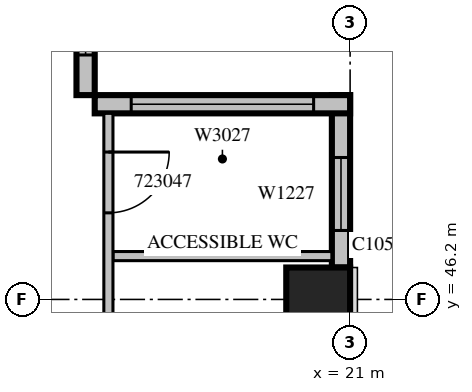
"""IFC4 building model, lengths in metres.
Left out: names, types, materials, properties, quantities, classifications, styles, units other than length and angle.
Written with IfcOpenShell. Run it as: python <this file> out.ifc"""

import sys

from ifc_helpers import new_model, si_unit, direction, frame, frame_2d, origin, origin_2d, place, context, subcontext, project, spatial, rectangle, extrude, source, transform, mapped, element, fill, save


model = new_model("IFC4")
c1 = context("Model", 3, precision=1e-05, world=origin(), true_north=direction((0.0, 1.0)))
c2 = subcontext(c1, "Body", "Model", "MODEL_VIEW")
j1 = project(units=[si_unit("LENGTHUNIT", "METRE"), si_unit("PLANEANGLEUNIT", "RADIAN")], contexts=[c1])
p1 = place(None, origin())
s1 = spatial("IfcSite", under=j1, at=p1, CompositionType="ELEMENT")
p2 = place(p1, origin())
s2 = spatial("IfcBuilding", under=s1, at=p2, CompositionType="ELEMENT")
p3 = place(p2, frame((0.0, 0.0, 107.7)))
s3 = spatial("IfcBuildingStorey", under=s2, at=p3, CompositionType="ELEMENT", Elevation=107.7)
m1 = source(origin(), c2, "Body", "SweptSolid", [
    extrude(rectangle(XDim=1.05, YDim=1.05, at=origin_2d()), origin(), (0.0, 0.0, 1.0), 4.2),
])
p4 = place(p3, frame((20.475, 46.2, 0.0), z_axis=(0.0, 0.0, 1.0), x_axis=(1.0, 0.0, 0.0)))
e1 = element("IfcColumn", 1, at=p4, inside=s3, PredefinedType="COLUMN", context=c2, shape_type="MappedRepresentation", body=[
    mapped(m1, transform((0.0, 0.0, 0.0), scale=1.0)),
])
m2 = source(origin(), c2, "Body", "SweptSolid", [
    extrude(rectangle(XDim=2.835, YDim=0.3, at=frame_2d((1.417, 0.0))), origin(), (0.0, 0.0, 1.0), 3.8),
])
p5 = place(p3, frame((20.85, 46.725, 0.0), z_axis=(0.0, 0.0, 1.0), x_axis=(0.0, 1.0, 0.0)))
e2 = element("IfcWall", 2, at=p5, inside=s3, PredefinedType="STANDARD", context=c2, shape_type="MappedRepresentation", body=[
    mapped(m2, transform((0.0, 0.0, 0.0), scale=1.0)),
])
m3 = source(origin(), c2, "Body", "SweptSolid", [
    extrude(rectangle(XDim=1.2, YDim=2.7, at=frame_2d((0.6, 1.35))), frame((0.0, 0.16, 0.0), z_axis=(0.0, -1.0, 0.0), x_axis=(1.0, 0.0, 0.0)), (0.0, 0.0, 1.0), 0.32),
])
p6 = place(p5, frame((0.609, 0.0, 0.6)))
e3 = element("IfcOpeningElement", 3, at=p6, cuts=e2, PredefinedType="OPENING", context=c2, shape_type="MappedRepresentation", body=[
    mapped(m3, transform((0.0, 0.0, 0.0), scale=1.0)),
])
m4 = source(origin(), c2, "Body", "SweptSolid", [
    extrude(rectangle(XDim=4.2, YDim=0.3, at=frame_2d((2.1, 0.0))), origin(), (0.0, 0.0, 1.0), 3.8),
])
p7 = place(p3, frame((21.0, 49.41, 0.0), z_axis=(0.0, 0.0, 1.0), x_axis=(-1.0, 0.0, 0.0)))
e4 = element("IfcWall", 4, at=p7, inside=s3, PredefinedType="STANDARD", context=c2, shape_type="MappedRepresentation", body=[
    mapped(m4, transform((0.0, 0.0, 0.0), scale=1.0)),
])
m5 = source(origin(), c2, "Body", "SweptSolid", [
    extrude(rectangle(XDim=3.0, YDim=2.7, at=frame_2d((1.5, 1.35))), frame((0.0, 0.16, 0.0), z_axis=(0.0, -1.0, 0.0), x_axis=(1.0, 0.0, 0.0)), (0.0, 0.0, 1.0), 0.32),
])
p8 = place(p7, frame((0.6, 0.0, 0.6)))
e5 = element("IfcOpeningElement", 5, at=p8, cuts=e4, PredefinedType="OPENING", context=c2, shape_type="MappedRepresentation", body=[
    mapped(m5, transform((0.0, 0.0, 0.0), scale=1.0)),
])
m6 = source(origin(), c2, "Body", "SweptSolid", [
    extrude(rectangle(XDim=2.52, YDim=0.3, at=frame_2d((1.26, 0.0))), origin(), (0.0, 0.0, 1.0), 3.8),
])
p9 = place(p3, frame((16.65, 49.56, 0.0), z_axis=(0.0, 0.0, 1.0), x_axis=(0.0, 1.0, 0.0)))
e6 = element("IfcWall", 6, at=p9, inside=s3, PredefinedType="STANDARD", context=c2, shape_type="MappedRepresentation", body=[
    mapped(m6, transform((0.0, 0.0, 0.0), scale=1.0)),
])
p10 = place(p9, frame((0.66, 0.0, 0.6)))
e7 = element("IfcOpeningElement", 7, at=p10, cuts=e6, PredefinedType="OPENING", context=c2, shape_type="MappedRepresentation", body=[
    mapped(m3, transform((0.0, 0.0, 0.0), scale=1.0)),
])
m7 = source(origin(), c2, "Body", "SweptSolid", [
    extrude(rectangle(XDim=3.6, YDim=0.15, at=frame_2d((1.8, 0.0))), origin(), (0.0, 0.0, 1.0), 3.8),
])
p11 = place(p3, frame((17.1, 46.913, 0.0), z_axis=(0.0, 0.0, 1.0), x_axis=(1.0, 0.0, 0.0)))
e8 = element("IfcWall", 8, at=p11, inside=s3, PredefinedType="PARTITIONING", context=c2, shape_type="MappedRepresentation", body=[
    mapped(m7, transform((0.0, 0.0, 0.0), scale=1.0)),
])
m8 = source(origin(), c2, "Body", "SweptSolid", [
    extrude(rectangle(XDim=19.86, YDim=0.15, at=frame_2d((9.93, 0.0))), origin(), (0.0, 0.0, 1.0), 3.8),
])
p12 = place(p3, frame((17.025, 49.26, 0.0), z_axis=(0.0, 0.0, 1.0), x_axis=(0.0, -1.0, 0.0)))
e9 = element("IfcWall", 9, at=p12, inside=s3, PredefinedType="PARTITIONING", context=c2, shape_type="MappedRepresentation", body=[
    mapped(m8, transform((0.0, 0.0, 0.0), scale=1.0)),
])
m9 = source(origin(), c2, "Body", "SweptSolid", [
    extrude(rectangle(XDim=1.0, YDim=2.1, at=frame_2d((0.5, 1.05))), frame((0.0, 0.085, 0.0), z_axis=(0.0, -1.0, 0.0), x_axis=(1.0, 0.0, 0.0)), (0.0, 0.0, 1.0), 0.17),
])
p13 = place(p12, frame((17.503, 0.0, 0.0)))
e10 = element("IfcOpeningElement", 10, at=p13, cuts=e9, PredefinedType="OPENING", context=c2, shape_type="MappedRepresentation", body=[
    mapped(m9, transform((0.0, 0.0, 0.0), scale=1.0)),
])
p14 = place(p12, frame((14.191, 0.0, 0.0)))
e11 = element("IfcOpeningElement", 11, at=p14, cuts=e9, PredefinedType="OPENING", context=c2, shape_type="MappedRepresentation", body=[
    mapped(m9, transform((0.0, 0.0, 0.0), scale=1.0)),
])
p15 = place(p12, frame((11.848, 0.0, 0.0)))
e12 = element("IfcOpeningElement", 12, at=p15, cuts=e9, PredefinedType="OPENING", context=c2, shape_type="MappedRepresentation", body=[
    mapped(m9, transform((0.0, 0.0, 0.0), scale=1.0)),
])
p16 = place(p12, frame((8.412, 0.0, 0.0)))
e13 = element("IfcOpeningElement", 13, at=p16, cuts=e9, PredefinedType="OPENING", context=c2, shape_type="MappedRepresentation", body=[
    mapped(m9, transform((0.0, 0.0, 0.0), scale=1.0)),
])
p17 = place(p12, frame((3.856, 0.0, 0.0)))
e14 = element("IfcOpeningElement", 14, at=p17, cuts=e9, PredefinedType="OPENING", context=c2, shape_type="MappedRepresentation", body=[
    mapped(m9, transform((0.0, 0.0, 0.0), scale=1.0)),
])
p18 = place(p12, frame((0.636, 0.0, 0.0)))
e15 = element("IfcOpeningElement", 15, at=p18, cuts=e9, PredefinedType="OPENING", context=c2, shape_type="MappedRepresentation", body=[
    mapped(m9, transform((0.0, 0.0, 0.0), scale=1.0)),
])
m10 = source(origin(), c2, "Body", "SweptSolid", [
    extrude(rectangle(XDim=1.2, YDim=2.7, at=frame_2d((0.6, 1.35))), frame((0.0, 0.03, 0.0), z_axis=(0.0, -1.0, 0.0), x_axis=(1.0, 0.0, 0.0)), (0.0, 0.0, 1.0), 0.06),
])
p19 = place(p6, origin())
e16 = element("IfcWindow", 16, at=p19, inside=s3, PartitioningType="SINGLE_PANEL", PredefinedType="WINDOW", context=c2, shape_type="MappedRepresentation", body=[
    mapped(m10, transform((0.0, 0.0, 0.0), scale=1.0)),
])
fill(e3, e16)
m11 = source(origin(), c2, "Body", "SweptSolid", [
    extrude(rectangle(XDim=3.0, YDim=2.7, at=frame_2d((1.5, 1.35))), frame((0.0, 0.03, 0.0), z_axis=(0.0, -1.0, 0.0), x_axis=(1.0, 0.0, 0.0)), (0.0, 0.0, 1.0), 0.06),
])
p20 = place(p8, origin())
e17 = element("IfcWindow", 17, at=p20, inside=s3, PartitioningType="SINGLE_PANEL", PredefinedType="WINDOW", context=c2, shape_type="MappedRepresentation", body=[
    mapped(m11, transform((0.0, 0.0, 0.0), scale=1.0)),
])
fill(e5, e17)
p21 = place(p10, origin())
e18 = element("IfcWindow", 18, at=p21, inside=s3, PartitioningType="SINGLE_PANEL", PredefinedType="WINDOW", context=c2, shape_type="MappedRepresentation", body=[
    mapped(m10, transform((0.0, 0.0, 0.0), scale=1.0)),
])
fill(e7, e18)
m12 = source(origin(), c2, "Body", "SweptSolid", [
    extrude(rectangle(XDim=1.0, YDim=2.1, at=frame_2d((0.5, 1.05))), frame((0.0, 0.025, 0.0), z_axis=(0.0, -1.0, 0.0), x_axis=(1.0, 0.0, 0.0)), (0.0, 0.0, 1.0), 0.05),
])
p22 = place(p18, origin())
e19 = element("IfcDoor", 19, at=p22, inside=s3, OperationType="SINGLE_SWING_LEFT", PredefinedType="DOOR", context=c2, shape_type="MappedRepresentation", body=[
    mapped(m12, transform((0.0, 0.0, 0.0), scale=1.0)),
])
fill(e15, e19)
save(model, sys.argv[1])
